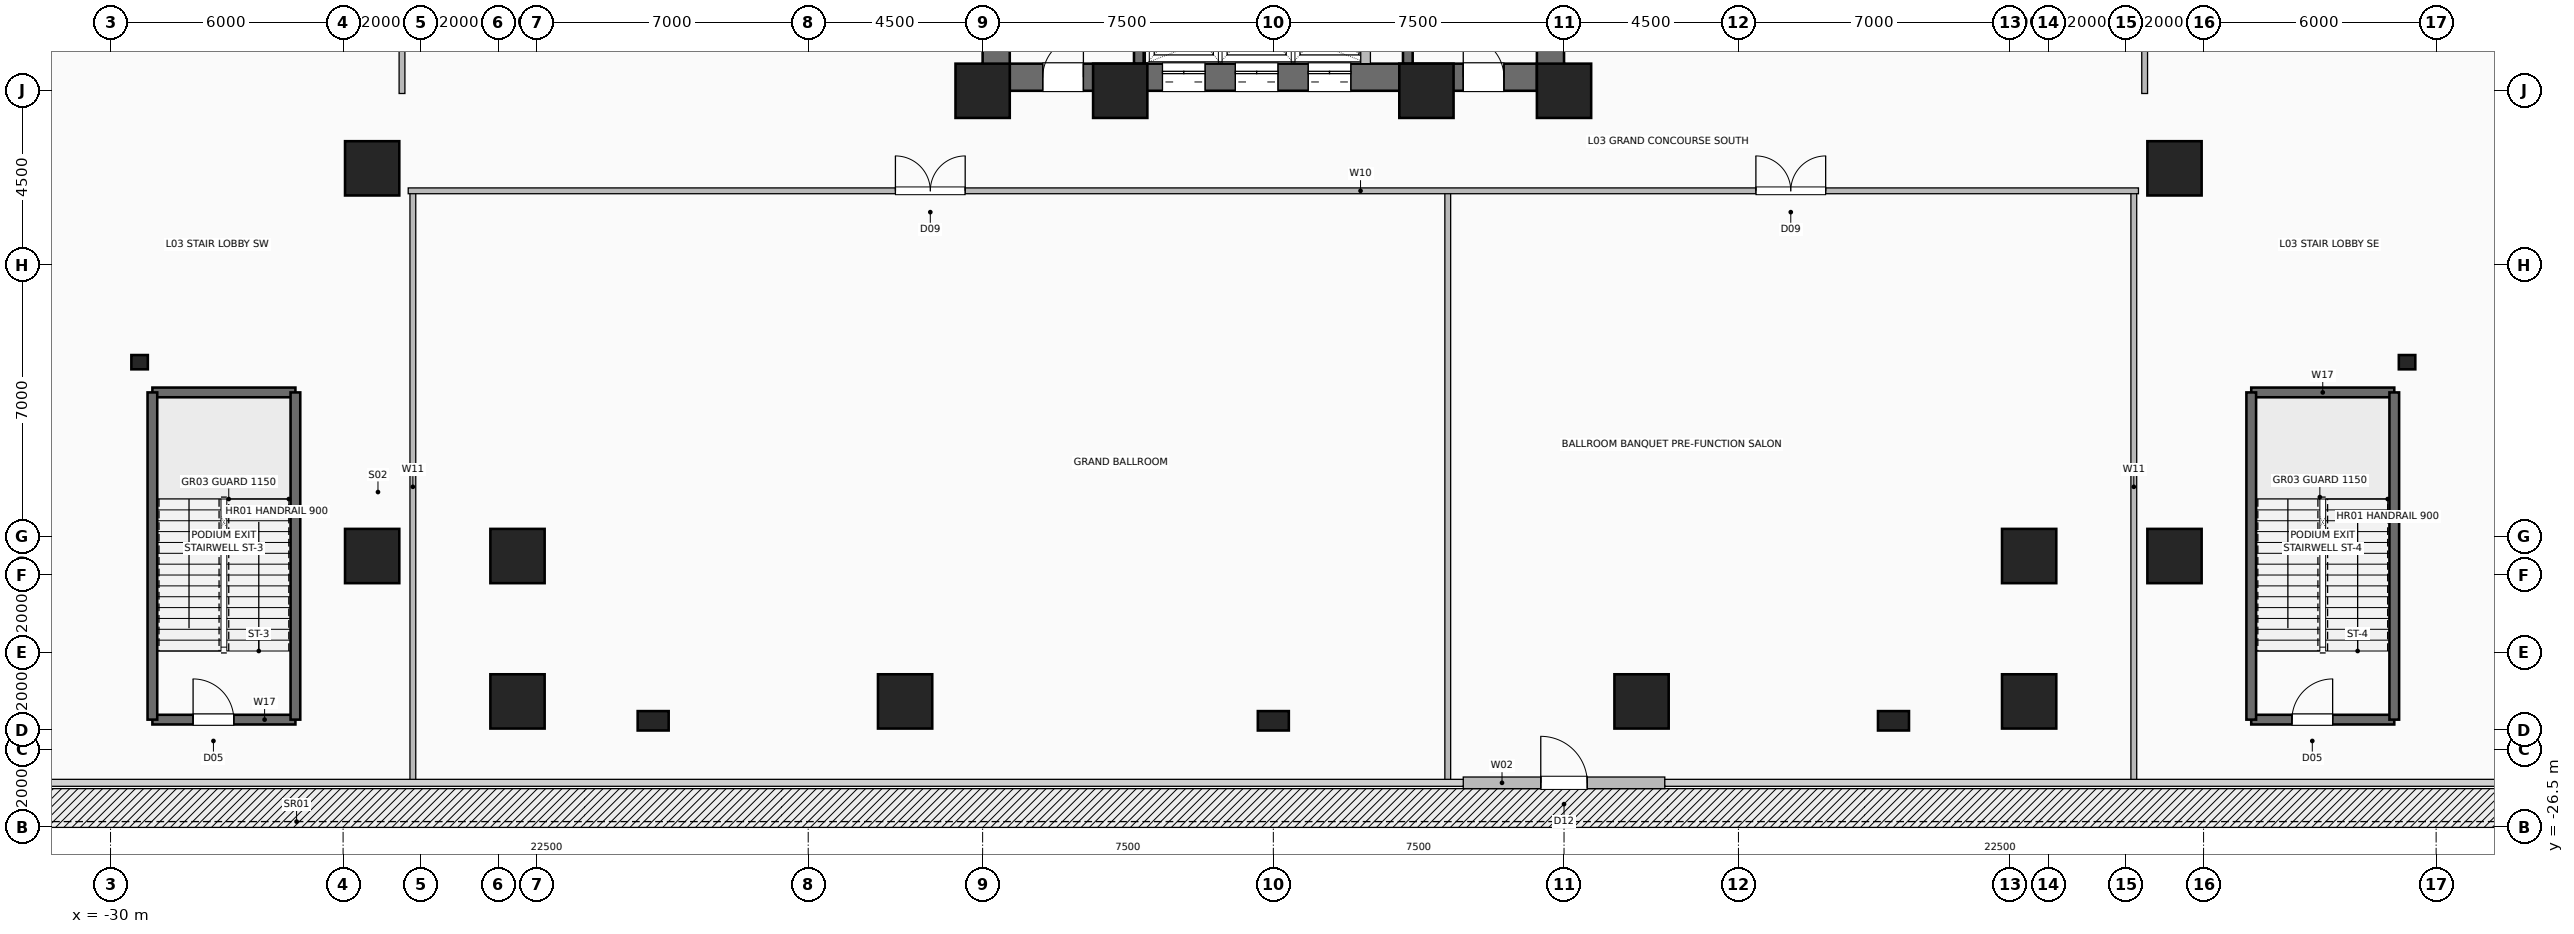
"""IFC4 building model, lengths in metres.
Left out: names, types, materials, properties, quantities, classifications, styles, units other than length and angle.
Written with IfcOpenShell. Run it as: python <this file> out.ifc"""

import sys

from ifc_helpers import new_model, si_unit, direction, frame, frame_2d, origin, origin_2d, place, context, subcontext, project, spatial, rectangle, hollow_rectangle, i_section, extrude, element, fill, save


model = new_model("IFC4")
c1 = context("Model", 3, precision=1e-05, world=origin(), true_north=direction((0.0, 1.0)))
c2 = subcontext(c1, "Body", "Model", "MODEL_VIEW")
j1 = project(units=[si_unit("LENGTHUNIT", "METRE"), si_unit("PLANEANGLEUNIT", "RADIAN")], contexts=[c1])
p1 = place(None, origin())
s1 = spatial("IfcSite", under=j1, at=p1, CompositionType="ELEMENT")
p2 = place(p1, origin())
s2 = spatial("IfcBuilding", under=s1, at=p2, CompositionType="ELEMENT")
p3 = place(p2, frame((0.0, 0.0, 16.2)))
s3 = spatial("IfcBuildingStorey", under=s2, at=p3, CompositionType="ELEMENT", Elevation=16.2)
for number, where, z_axis, x_axis in (
    (1, (-7.5, -7.5, 0.0), (0.0, 0.0, 1.0), (1.0, 0.0, 0.0)),
    (2, (-3.95, -7.5, 0.0), (0.0, 0.0, 1.0), (1.0, 0.0, 0.0)),
    (3, (3.95, -7.5, 0.0), (0.0, 0.0, 1.0), (1.0, 0.0, 0.0)),
    (4, (7.5, -7.5, 0.0), (0.0, 0.0, 1.0), (1.0, 0.0, 0.0)),
    (5, (-19.5, -23.25, 0.0), (0.0, 0.0, 1.0), (1.0, 0.0, 0.0)),
    (6, (-9.5, -23.25, 0.0), (0.0, 0.0, 1.0), (1.0, 0.0, 0.0)),
    (7, (9.5, -23.25, 0.0), (0.0, 0.0, 1.0), (1.0, 0.0, 0.0)),
    (8, (19.5, -23.25, 0.0), (0.0, 0.0, 1.0), (1.0, 0.0, 0.0)),
    (9, (-23.25, -19.5, 0.0), (0.0, 0.0, 1.0), (1.0, 0.0, 0.0)),
    (10, (-23.25, -9.5, 0.0), (0.0, 0.0, 1.0), (1.0, 0.0, 0.0)),
    (11, (23.25, -19.5, 0.0), (0.0, 0.0, 1.0), (1.0, 0.0, 0.0)),
    (12, (23.25, -9.5, 0.0), (0.0, 0.0, 1.0), (1.0, 0.0, 0.0)),
    (13, (-19.5, -19.5, 0.0), (0.0, 0.0, 1.0), (1.0, 0.0, 0.0)),
    (14, (19.5, -19.5, 0.0), (0.0, 0.0, 1.0), (1.0, 0.0, 0.0)),
):
    element("IfcColumn", number, at=place(p3, frame(where, z_axis=z_axis, x_axis=x_axis)), inside=s3, PredefinedType="COLUMN", context=c2, shape_type="SweptSolid", body=[
        extrude(hollow_rectangle(XDim=1.4, YDim=1.4, WallThickness=0.06, at=origin_2d()), origin(), (0.0, 0.0, 1.0), 5.4),
    ])
for number, where, z_axis, x_axis in (
    (15, (-29.25, -14.5, 0.0), (0.0, 0.0, 1.0), (1.0, 0.0, 0.0)),
    (16, (29.25, -14.5, 0.0), (0.0, 0.0, 1.0), (1.0, 0.0, 0.0)),
):
    element("IfcColumn", number, at=place(p3, frame(where, z_axis=z_axis, x_axis=x_axis)), inside=s3, PredefinedType="COLUMN", context=c2, shape_type="SweptSolid", body=[
        extrude(i_section(OverallWidth=0.368, OverallDepth=0.425, WebThickness=0.03, FlangeThickness=0.048, FilletRadius=0.02, at=origin_2d()), origin(), (0.0, 0.0, 1.0), 5.4),
    ])
for number, where, z_axis, x_axis in (
    (17, (-16.0, -23.75, 0.0), (0.0, 0.0, 1.0), (1.0, 0.0, 0.0)),
    (18, (0.0, -23.75, 0.0), (0.0, 0.0, 1.0), (1.0, 0.0, 0.0)),
    (19, (16.0, -23.75, 0.0), (0.0, 0.0, 1.0), (1.0, 0.0, 0.0)),
):
    element("IfcColumn", number, at=place(p3, frame(where, z_axis=z_axis, x_axis=x_axis)), inside=s3, PredefinedType="PILASTER", context=c2, shape_type="SweptSolid", body=[
        extrude(rectangle(XDim=0.5, YDim=0.8, at=origin_2d()), origin(), (0.0, 0.0, 1.0), 5.4),
    ])
p4 = place(p3, frame((4.9, -25.35, 0.0), z_axis=(0.0, 0.0, 1.0), x_axis=(1.0, 0.0, 0.0)))
e20 = element("IfcWall", 20, at=p4, inside=s3, PredefinedType="SOLIDWALL", context=c2, shape_type="SweptSolid", body=[
    extrude(rectangle(XDim=5.2, YDim=0.3, at=frame_2d((2.6, 0.0))), origin(), (0.0, 0.0, 1.0), 5.0),
])
p5 = place(p4, frame((2.0, 0.0, 0.0)))
e21 = element("IfcOpeningElement", 21, at=p5, cuts=e20, PredefinedType="OPENING", context=c2, shape_type="SweptSolid", body=[
    extrude(rectangle(XDim=1.2, YDim=2.25, at=frame_2d((0.6, 1.125))), frame((0.0, 0.16, 0.0), z_axis=(0.0, -1.0, 0.0), x_axis=(1.0, 0.0, 0.0)), (0.0, 0.0, 1.0), 0.32),
])
p6 = place(p3, frame((-7.5, -7.15, 0.0), z_axis=(0.0, 0.0, 1.0), x_axis=(1.0, 0.0, 0.0)))
e22 = element("IfcWall", 22, at=p6, inside=s3, PredefinedType="SHEAR", context=c2, shape_type="SweptSolid", body=[
    extrude(rectangle(XDim=15.0, YDim=0.7, at=frame_2d((7.5, 0.0))), origin(), (0.0, 0.0, 1.0), 5.0),
])
p7 = place(p6, frame((1.55, 0.0, 0.0)))
e23 = element("IfcOpeningElement", 23, at=p7, cuts=e22, PredefinedType="OPENING", context=c2, shape_type="SweptSolid", body=[
    extrude(rectangle(XDim=1.05, YDim=2.08, at=frame_2d((0.525, 1.04))), frame((0.0, 0.36, 0.0), z_axis=(0.0, -1.0, 0.0), x_axis=(1.0, 0.0, 0.0)), (0.0, 0.0, 1.0), 0.72),
])
p8 = place(p6, frame((12.4, 0.0, 0.0)))
e24 = element("IfcOpeningElement", 24, at=p8, cuts=e22, PredefinedType="OPENING", context=c2, shape_type="SweptSolid", body=[
    extrude(rectangle(XDim=1.05, YDim=2.08, at=frame_2d((0.525, 1.04))), frame((0.0, 0.36, 0.0), z_axis=(0.0, -1.0, 0.0), x_axis=(1.0, 0.0, 0.0)), (0.0, 0.0, 1.0), 0.72),
])
p9 = place(p6, frame((4.64, 0.0, 0.0)))
e25 = element("IfcOpeningElement", 25, at=p9, cuts=e22, PredefinedType="OPENING", context=c2, shape_type="SweptSolid", body=[
    extrude(rectangle(XDim=1.1, YDim=2.2, at=frame_2d((0.55, 1.1))), frame((0.0, 0.36, 0.0), z_axis=(0.0, -1.0, 0.0), x_axis=(1.0, 0.0, 0.0)), (0.0, 0.0, 1.0), 0.72),
])
p10 = place(p6, frame((6.52, 0.0, 0.0)))
e26 = element("IfcOpeningElement", 26, at=p10, cuts=e22, PredefinedType="OPENING", context=c2, shape_type="SweptSolid", body=[
    extrude(rectangle(XDim=1.1, YDim=2.2, at=frame_2d((0.55, 1.1))), frame((0.0, 0.36, 0.0), z_axis=(0.0, -1.0, 0.0), x_axis=(1.0, 0.0, 0.0)), (0.0, 0.0, 1.0), 0.72),
])
p11 = place(p6, frame((8.4, 0.0, 0.0)))
e27 = element("IfcOpeningElement", 27, at=p11, cuts=e22, PredefinedType="OPENING", context=c2, shape_type="SweptSolid", body=[
    extrude(rectangle(XDim=1.1, YDim=2.2, at=frame_2d((0.55, 1.1))), frame((0.0, 0.36, 0.0), z_axis=(0.0, -1.0, 0.0), x_axis=(1.0, 0.0, 0.0)), (0.0, 0.0, 1.0), 0.72),
])
p12 = place(p3, frame((-7.15, -7.5, 0.0), z_axis=(0.0, 0.0, 1.0), x_axis=(0.0, 1.0, 0.0)))
e28 = element("IfcWall", 28, at=p12, inside=s3, PredefinedType="SHEAR", context=c2, shape_type="SweptSolid", body=[
    extrude(rectangle(XDim=15.0, YDim=0.7, at=frame_2d((7.5, 0.0))), origin(), (0.0, 0.0, 1.0), 5.0),
])
p13 = place(p12, frame((9.5, 0.0, 0.0)))
e29 = element("IfcOpeningElement", 29, at=p13, cuts=e28, PredefinedType="OPENING", context=c2, shape_type="SweptSolid", body=[
    extrude(rectangle(XDim=1.0, YDim=2.08, at=frame_2d((0.5, 1.04))), frame((0.0, 0.36, 0.0), z_axis=(0.0, -1.0, 0.0), x_axis=(1.0, 0.0, 0.0)), (0.0, 0.0, 1.0), 0.72),
])
p14 = place(p3, frame((7.15, -7.5, 0.0), z_axis=(0.0, 0.0, 1.0), x_axis=(0.0, 1.0, 0.0)))
e30 = element("IfcWall", 30, at=p14, inside=s3, PredefinedType="SHEAR", context=c2, shape_type="SweptSolid", body=[
    extrude(rectangle(XDim=15.0, YDim=0.7, at=frame_2d((7.5, 0.0))), origin(), (0.0, 0.0, 1.0), 5.0),
])
p15 = place(p14, frame((12.6, 0.0, 0.0)))
e31 = element("IfcOpeningElement", 31, at=p15, cuts=e30, PredefinedType="OPENING", context=c2, shape_type="SweptSolid", body=[
    extrude(rectangle(XDim=1.2, YDim=2.2, at=frame_2d((0.6, 1.1))), frame((0.0, 0.36, 0.0), z_axis=(0.0, -1.0, 0.0), x_axis=(1.0, 0.0, 0.0)), (0.0, 0.0, 1.0), 0.72),
])
for number, where, z_axis, x_axis in (
    (32, (-3.47, -6.8, 0.0), (0.0, 0.0, 1.0), (0.0, 1.0, 0.0)),
    (33, (3.47, -6.8, 0.0), (0.0, 0.0, 1.0), (0.0, 1.0, 0.0)),
):
    element("IfcWall", number, at=place(p3, frame(where, z_axis=z_axis, x_axis=x_axis)), inside=s3, PredefinedType="SHEAR", context=c2, shape_type="SweptSolid", body=[
        extrude(rectangle(XDim=7.72, YDim=0.25, at=frame_2d((3.86, 0.0))), origin(), (0.0, 0.0, 1.0), 5.0),
    ])
p16 = place(p3, frame((2.38, -6.8, 0.0), z_axis=(0.0, 0.0, 1.0), x_axis=(0.0, 1.0, 0.0)))
e34 = element("IfcWall", 34, at=p16, inside=s3, PredefinedType="SHEAR", context=c2, shape_type="SweptSolid", body=[
    extrude(rectangle(XDim=2.22, YDim=0.25, at=frame_2d((1.11, 0.0))), origin(), (0.0, 0.0, 1.0), 5.0),
])
p17 = place(p3, frame((-28.92, -23.72, 0.0), z_axis=(0.0, 0.0, 1.0), x_axis=(1.0, 0.0, 0.0)))
e35 = element("IfcWall", 35, at=p17, inside=s3, PredefinedType="SHEAR", context=c2, shape_type="SweptSolid", body=[
    extrude(rectangle(XDim=3.69, YDim=0.25, at=frame_2d((1.845, 0.0))), origin(), (0.0, 0.0, 1.0), 5.0),
])
p18 = place(p17, frame((1.05, 0.0, 0.0)))
e36 = element("IfcOpeningElement", 36, at=p18, cuts=e35, PredefinedType="OPENING", context=c2, shape_type="SweptSolid", body=[
    extrude(rectangle(XDim=1.05, YDim=2.08, at=frame_2d((0.525, 1.04))), frame((0.0, 0.135, 0.0), z_axis=(0.0, -1.0, 0.0), x_axis=(1.0, 0.0, 0.0)), (0.0, 0.0, 1.0), 0.27),
])
p19 = place(p3, frame((-28.92, -15.28, 0.0), z_axis=(0.0, 0.0, 1.0), x_axis=(1.0, 0.0, 0.0)))
e37 = element("IfcWall", 37, at=p19, inside=s3, PredefinedType="SHEAR", context=c2, shape_type="SweptSolid", body=[
    extrude(rectangle(XDim=3.69, YDim=0.25, at=frame_2d((1.845, 0.0))), origin(), (0.0, 0.0, 1.0), 5.0),
])
for number, where, z_axis, x_axis in (
    (38, (-28.92, -23.72, 0.0), (0.0, 0.0, 1.0), (0.0, 1.0, 0.0)),
    (39, (-25.23, -23.72, 0.0), (0.0, 0.0, 1.0), (0.0, 1.0, 0.0)),
):
    element("IfcWall", number, at=place(p3, frame(where, z_axis=z_axis, x_axis=x_axis)), inside=s3, PredefinedType="SHEAR", context=c2, shape_type="SweptSolid", body=[
        extrude(rectangle(XDim=8.44, YDim=0.25, at=frame_2d((4.22, 0.0))), origin(), (0.0, 0.0, 1.0), 5.0),
    ])
p20 = place(p3, frame((25.23, -23.72, 0.0), z_axis=(0.0, 0.0, 1.0), x_axis=(1.0, 0.0, 0.0)))
e40 = element("IfcWall", 40, at=p20, inside=s3, PredefinedType="SHEAR", context=c2, shape_type="SweptSolid", body=[
    extrude(rectangle(XDim=3.69, YDim=0.25, at=frame_2d((1.845, 0.0))), origin(), (0.0, 0.0, 1.0), 5.0),
])
p21 = place(p20, frame((1.05, 0.0, 0.0)))
e41 = element("IfcOpeningElement", 41, at=p21, cuts=e40, PredefinedType="OPENING", context=c2, shape_type="SweptSolid", body=[
    extrude(rectangle(XDim=1.05, YDim=2.08, at=frame_2d((0.525, 1.04))), frame((0.0, 0.135, 0.0), z_axis=(0.0, -1.0, 0.0), x_axis=(1.0, 0.0, 0.0)), (0.0, 0.0, 1.0), 0.27),
])
p22 = place(p3, frame((25.23, -15.28, 0.0), z_axis=(0.0, 0.0, 1.0), x_axis=(1.0, 0.0, 0.0)))
e42 = element("IfcWall", 42, at=p22, inside=s3, PredefinedType="SHEAR", context=c2, shape_type="SweptSolid", body=[
    extrude(rectangle(XDim=3.69, YDim=0.25, at=frame_2d((1.845, 0.0))), origin(), (0.0, 0.0, 1.0), 5.0),
])
for number, where, z_axis, x_axis in (
    (43, (25.23, -23.72, 0.0), (0.0, 0.0, 1.0), (0.0, 1.0, 0.0)),
    (44, (28.92, -23.72, 0.0), (0.0, 0.0, 1.0), (0.0, 1.0, 0.0)),
):
    element("IfcWall", number, at=place(p3, frame(where, z_axis=z_axis, x_axis=x_axis)), inside=s3, PredefinedType="SHEAR", context=c2, shape_type="SweptSolid", body=[
        extrude(rectangle(XDim=8.44, YDim=0.25, at=frame_2d((4.22, 0.0))), origin(), (0.0, 0.0, 1.0), 5.0),
    ])
for number, where, z_axis, x_axis in (
    (45, (-22.2, -25.35, 0.0), (0.0, 0.0, 1.0), (0.0, 1.0, 0.0)),
    (46, (4.5, -25.35, 0.0), (0.0, 0.0, 1.0), (0.0, 1.0, 0.0)),
    (47, (22.2, -25.35, 0.0), (0.0, 0.0, 1.0), (0.0, 1.0, 0.0)),
):
    element("IfcWall", number, at=place(p3, frame(where, z_axis=z_axis, x_axis=x_axis)), inside=s3, PredefinedType="PARTITIONING", context=c2, shape_type="SweptSolid", body=[
        extrude(rectangle(XDim=15.27, YDim=0.15, at=frame_2d((7.635, 0.0))), origin(), (0.0, 0.0, 1.0), 5.0),
    ])
p23 = place(p3, frame((-22.32, -10.08, 0.0), z_axis=(0.0, 0.0, 1.0), x_axis=(1.0, 0.0, 0.0)))
e48 = element("IfcWall", 48, at=p23, inside=s3, PredefinedType="PARTITIONING", context=c2, shape_type="SweptSolid", body=[
    extrude(rectangle(XDim=44.64, YDim=0.15, at=frame_2d((22.32, 0.0))), origin(), (0.0, 0.0, 1.0), 5.0),
])
p24 = place(p23, frame((12.57, 0.0, 0.0)))
e49 = element("IfcOpeningElement", 49, at=p24, cuts=e48, PredefinedType="OPENING", context=c2, shape_type="SweptSolid", body=[
    extrude(rectangle(XDim=1.8, YDim=2.08, at=frame_2d((0.9, 1.04))), frame((0.0, 0.085, 0.0), z_axis=(0.0, -1.0, 0.0), x_axis=(1.0, 0.0, 0.0)), (0.0, 0.0, 1.0), 0.17),
])
p25 = place(p23, frame((34.77, 0.0, 0.0)))
e50 = element("IfcOpeningElement", 50, at=p25, cuts=e48, PredefinedType="OPENING", context=c2, shape_type="SweptSolid", body=[
    extrude(rectangle(XDim=1.8, YDim=2.08, at=frame_2d((0.9, 1.04))), frame((0.0, 0.085, 0.0), z_axis=(0.0, -1.0, 0.0), x_axis=(1.0, 0.0, 0.0)), (0.0, 0.0, 1.0), 0.17),
])
p26 = place(p3, frame((-22.48, -7.57, 0.0), z_axis=(0.0, 0.0, 1.0), x_axis=(0.0, 1.0, 0.0)))
e51 = element("IfcWall", 51, at=p26, inside=s3, PredefinedType="PARTITIONING", context=c2, shape_type="SweptSolid", body=[
    extrude(rectangle(XDim=12.29, YDim=0.15, at=frame_2d((6.145, 0.0))), origin(), (0.0, 0.0, 1.0), 5.0),
])
p27 = place(p26, frame((5.205, 0.0, 0.0)))
e52 = element("IfcOpeningElement", 52, at=p27, cuts=e51, PredefinedType="OPENING", context=c2, shape_type="SweptSolid", body=[
    extrude(rectangle(XDim=1.8, YDim=2.08, at=frame_2d((0.9, 1.04))), frame((0.0, 0.085, 0.0), z_axis=(0.0, -1.0, 0.0), x_axis=(1.0, 0.0, 0.0)), (0.0, 0.0, 1.0), 0.17),
])
p28 = place(p3, frame((22.48, -7.57, 0.0), z_axis=(0.0, 0.0, 1.0), x_axis=(0.0, 1.0, 0.0)))
e53 = element("IfcWall", 53, at=p28, inside=s3, PredefinedType="PARTITIONING", context=c2, shape_type="SweptSolid", body=[
    extrude(rectangle(XDim=9.24, YDim=0.15, at=frame_2d((4.62, 0.0))), origin(), (0.0, 0.0, 1.0), 5.0),
])
p29 = place(p28, frame((1.58, 0.0, 0.0)))
e54 = element("IfcOpeningElement", 54, at=p29, cuts=e53, PredefinedType="OPENING", context=c2, shape_type="SweptSolid", body=[
    extrude(rectangle(XDim=0.95, YDim=2.06, at=frame_2d((0.475, 1.03))), frame((0.0, 0.085, 0.0), z_axis=(0.0, -1.0, 0.0), x_axis=(1.0, 0.0, 0.0)), (0.0, 0.0, 1.0), 0.17),
])
p30 = place(p28, frame((4.785, 0.0, 0.0)))
e55 = element("IfcOpeningElement", 55, at=p30, cuts=e53, PredefinedType="OPENING", context=c2, shape_type="SweptSolid", body=[
    extrude(rectangle(XDim=0.85, YDim=2.05, at=frame_2d((0.425, 1.025))), frame((0.0, 0.085, 0.0), z_axis=(0.0, -1.0, 0.0), x_axis=(1.0, 0.0, 0.0)), (0.0, 0.0, 1.0), 0.17),
])
p31 = place(p28, frame((7.26, 0.0, 0.0)))
e56 = element("IfcOpeningElement", 56, at=p31, cuts=e53, PredefinedType="OPENING", context=c2, shape_type="SweptSolid", body=[
    extrude(rectangle(XDim=0.95, YDim=2.06, at=frame_2d((0.475, 1.03))), frame((0.0, 0.085, 0.0), z_axis=(0.0, -1.0, 0.0), x_axis=(1.0, 0.0, 0.0)), (0.0, 0.0, 1.0), 0.17),
])
p32 = place(p5, origin())
e57 = element("IfcDoor", 57, at=p32, inside=s3, OperationType="SINGLE_SWING_LEFT", PredefinedType="DOOR", context=c2, shape_type="SweptSolid", body=[
    extrude(rectangle(XDim=1.2, YDim=2.25, at=frame_2d((0.6, 1.125))), frame((0.0, 0.025, 0.0), z_axis=(0.0, -1.0, 0.0), x_axis=(1.0, 0.0, 0.0)), (0.0, 0.0, 1.0), 0.05),
])
fill(e21, e57)
p33 = place(p7, origin())
e58 = element("IfcDoor", 58, at=p33, inside=s3, OperationType="SINGLE_SWING_RIGHT", PredefinedType="DOOR", context=c2, shape_type="SweptSolid", body=[
    extrude(rectangle(XDim=1.05, YDim=2.08, at=frame_2d((0.525, 1.04))), frame((0.0, 0.025, 0.0), z_axis=(0.0, -1.0, 0.0), x_axis=(1.0, 0.0, 0.0)), (0.0, 0.0, 1.0), 0.05),
])
fill(e23, e58)
p34 = place(p8, origin())
e59 = element("IfcDoor", 59, at=p34, inside=s3, OperationType="SINGLE_SWING_LEFT", PredefinedType="DOOR", context=c2, shape_type="SweptSolid", body=[
    extrude(rectangle(XDim=1.05, YDim=2.08, at=frame_2d((0.525, 1.04))), frame((0.0, 0.025, 0.0), z_axis=(0.0, -1.0, 0.0), x_axis=(1.0, 0.0, 0.0)), (0.0, 0.0, 1.0), 0.05),
])
fill(e24, e59)
p35 = place(p9, origin())
e60 = element("IfcDoor", 60, at=p35, inside=s3, OperationType="DOUBLE_DOOR_SLIDING", PredefinedType="DOOR", context=c2, shape_type="SweptSolid", body=[
    extrude(rectangle(XDim=1.1, YDim=2.2, at=frame_2d((0.55, 1.1))), frame((0.0, 0.025, 0.0), z_axis=(0.0, -1.0, 0.0), x_axis=(1.0, 0.0, 0.0)), (0.0, 0.0, 1.0), 0.05),
])
fill(e25, e60)
p36 = place(p10, origin())
e61 = element("IfcDoor", 61, at=p36, inside=s3, OperationType="DOUBLE_DOOR_SLIDING", PredefinedType="DOOR", context=c2, shape_type="SweptSolid", body=[
    extrude(rectangle(XDim=1.1, YDim=2.2, at=frame_2d((0.55, 1.1))), frame((0.0, 0.025, 0.0), z_axis=(0.0, -1.0, 0.0), x_axis=(1.0, 0.0, 0.0)), (0.0, 0.0, 1.0), 0.05),
])
fill(e26, e61)
p37 = place(p11, origin())
e62 = element("IfcDoor", 62, at=p37, inside=s3, OperationType="DOUBLE_DOOR_SLIDING", PredefinedType="DOOR", context=c2, shape_type="SweptSolid", body=[
    extrude(rectangle(XDim=1.1, YDim=2.2, at=frame_2d((0.55, 1.1))), frame((0.0, 0.025, 0.0), z_axis=(0.0, -1.0, 0.0), x_axis=(1.0, 0.0, 0.0)), (0.0, 0.0, 1.0), 0.05),
])
fill(e27, e62)
p38 = place(p18, origin())
e63 = element("IfcDoor", 63, at=p38, inside=s3, OperationType="SINGLE_SWING_LEFT", PredefinedType="DOOR", context=c2, shape_type="SweptSolid", body=[
    extrude(rectangle(XDim=1.05, YDim=2.08, at=frame_2d((0.525, 1.04))), frame((0.0, 0.025, 0.0), z_axis=(0.0, -1.0, 0.0), x_axis=(1.0, 0.0, 0.0)), (0.0, 0.0, 1.0), 0.05),
])
fill(e36, e63)
p39 = place(p21, origin())
e64 = element("IfcDoor", 64, at=p39, inside=s3, OperationType="SINGLE_SWING_RIGHT", PredefinedType="DOOR", context=c2, shape_type="SweptSolid", body=[
    extrude(rectangle(XDim=1.05, YDim=2.08, at=frame_2d((0.525, 1.04))), frame((0.0, 0.025, 0.0), z_axis=(0.0, -1.0, 0.0), x_axis=(1.0, 0.0, 0.0)), (0.0, 0.0, 1.0), 0.05),
])
fill(e41, e64)
p40 = place(p24, origin())
e65 = element("IfcDoor", 65, at=p40, inside=s3, OperationType="DOUBLE_DOOR_SINGLE_SWING", PredefinedType="DOOR", context=c2, shape_type="SweptSolid", body=[
    extrude(rectangle(XDim=1.8, YDim=2.08, at=frame_2d((0.9, 1.04))), frame((0.0, 0.025, 0.0), z_axis=(0.0, -1.0, 0.0), x_axis=(1.0, 0.0, 0.0)), (0.0, 0.0, 1.0), 0.05),
])
fill(e49, e65)
p41 = place(p25, origin())
e66 = element("IfcDoor", 66, at=p41, inside=s3, OperationType="DOUBLE_DOOR_SINGLE_SWING", PredefinedType="DOOR", context=c2, shape_type="SweptSolid", body=[
    extrude(rectangle(XDim=1.8, YDim=2.08, at=frame_2d((0.9, 1.04))), frame((0.0, 0.025, 0.0), z_axis=(0.0, -1.0, 0.0), x_axis=(1.0, 0.0, 0.0)), (0.0, 0.0, 1.0), 0.05),
])
fill(e50, e66)
save(model, sys.argv[1])
